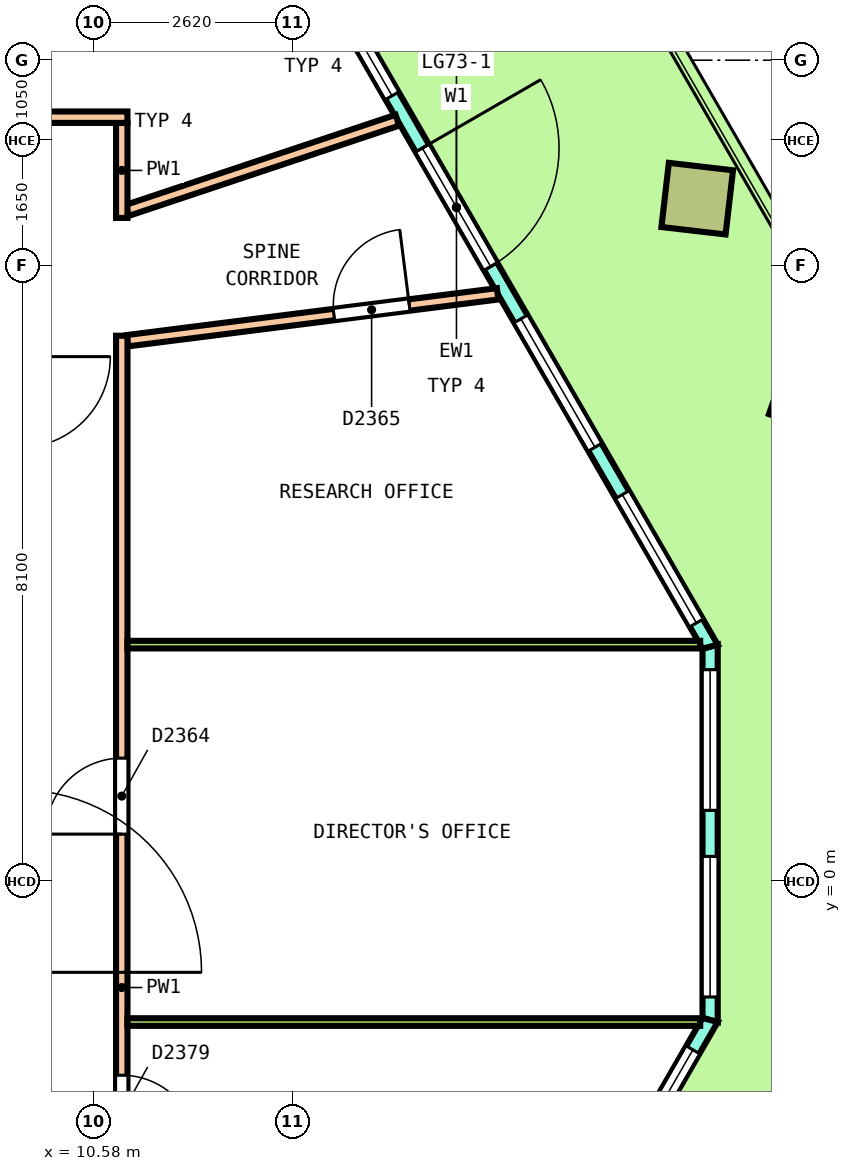
"""IFC4 building model, lengths in metres.
Left out: names, types, materials, properties, quantities, classifications, styles, units other than length and angle.
Written with IfcOpenShell. Run it as: python <this file> out.ifc"""

import sys

from ifc_helpers import new_model, si_unit, direction, frame, frame_2d, origin, origin_2d, place, context, subcontext, project, spatial, polyline, rectangle, outline, extrude, element, fill, save


model = new_model("IFC4")
c1 = context("Model", 3, precision=1e-05, world=origin(), true_north=direction((0.0, 1.0)))
c2 = subcontext(c1, "Body", "Model", "MODEL_VIEW")
j1 = project(units=[si_unit("LENGTHUNIT", "METRE"), si_unit("PLANEANGLEUNIT", "RADIAN")], contexts=[c1])
p1 = place(None, origin())
s1 = spatial("IfcSite", under=j1, at=p1, CompositionType="ELEMENT")
p2 = place(p1, origin())
s2 = spatial("IfcBuilding", under=s1, at=p2, CompositionType="ELEMENT")
p3 = place(p2, frame((0.0, 0.0, 328.6)))
s3 = spatial("IfcBuildingStorey", under=s2, at=p3, CompositionType="ELEMENT", Elevation=328.6)
p4 = place(p3, frame((20.006, 6.406, 0.0), z_axis=(0.021727128018, 0.025136615799, 0.999447888814), x_axis=(-0.501407060892, 0.86514336922, -0.010858636257)))
e1 = element("IfcColumn", 1, at=p4, inside=s3, PredefinedType="COLUMN", context=c2, shape_type="SweptSolid", body=[
    extrude(rectangle(XDim=0.85, YDim=0.85, at=origin_2d()), origin(), (0.0, 0.0, 1.0), 3.652),
])
p5 = place(p3, frame((18.521, 8.978, 0.0), z_axis=(0.025338523594, 0.018853466104, 0.999501128583), x_axis=(-0.500627648171, 0.865655086229, -0.00363724787)))
e2 = element("IfcColumn", 2, at=p5, inside=s3, PredefinedType="COLUMN", context=c2, shape_type="SweptSolid", body=[
    extrude(rectangle(XDim=0.85, YDim=0.85, at=origin_2d()), origin(), (0.0, 0.0, 1.0), 3.652),
])
p6 = place(p3, frame((18.69, -1.827, 0.0), z_axis=(0.0, 0.0, 1.0), x_axis=(0.0, 1.0, 0.0)))
e3 = element("IfcWall", 3, at=p6, inside=s3, PredefinedType="SOLIDWALL", context=c2, shape_type="SweptSolid", body=[
    extrude(outline(polyline([(-0.027, -0.1), (1.214, -0.1), (2.456, -0.1), (3.697, -0.1), (4.938, -0.1), (4.885, 0.1), (3.67, 0.1), (2.456, 0.1), (1.241, 0.1), (0.027, 0.1), (-0.027, -0.1)])), origin(), (0.0, 0.0, 1.0), 3.7),
])
p7 = place(p6, frame((0.303, 0.0, 0.1)))
e4 = element("IfcOpeningElement", 4, at=p7, cuts=e3, PredefinedType="OPENING", context=c2, shape_type="SweptSolid", body=[
    extrude(rectangle(XDim=1.85, YDim=2.9, at=frame_2d((0.925, 1.45))), frame((0.0, 0.11, 0.0), z_axis=(0.0, -1.0, 0.0), x_axis=(1.0, 0.0, 0.0)), (0.0, 0.0, 1.0), 0.22),
])
p8 = place(p6, frame((2.759, 0.0, 0.1)))
e5 = element("IfcOpeningElement", 5, at=p8, cuts=e3, PredefinedType="OPENING", context=c2, shape_type="SweptSolid", body=[
    extrude(rectangle(XDim=1.85, YDim=2.9, at=frame_2d((0.925, 1.45))), frame((0.0, 0.11, 0.0), z_axis=(0.0, -1.0, 0.0), x_axis=(1.0, 0.0, 0.0)), (0.0, 0.0, 1.0), 0.22),
])
p9 = place(p3, frame((18.69, 3.084, 0.0), z_axis=(0.0, 0.0, 1.0), x_axis=(-0.499992657759, 0.866029642788, 0.0)))
e6 = element("IfcWall", 6, at=p9, inside=s3, PredefinedType="SOLIDWALL", context=c2, shape_type="SweptSolid", body=[
    extrude(outline(polyline([(-0.027, -0.1), (1.004, -0.1), (2.035, -0.1), (3.066, -0.1), (4.097, -0.1), (5.128, -0.1), (6.159, -0.1), (7.19, -0.1), (8.221, -0.1), (9.251, -0.1), (10.282, -0.1), (11.313, -0.1), (12.344, -0.1), (13.375, -0.1), (13.322, 0.1), (12.299, 0.1), (11.276, 0.1), (10.253, 0.1), (9.231, 0.1), (8.208, 0.1), (7.186, 0.1), (6.163, 0.1), (5.14, 0.1), (4.117, 0.1), (3.095, 0.1), (2.072, 0.1), (1.05, 0.1), (0.027, 0.1), (-0.027, -0.1)])), origin(), (0.0, 0.0, 1.0), 3.7),
])
p10 = place(p9, frame((0.36, 0.0, 0.1)))
e7 = element("IfcOpeningElement", 7, at=p10, cuts=e6, PredefinedType="OPENING", context=c2, shape_type="SweptSolid", body=[
    extrude(rectangle(XDim=1.95, YDim=2.9, at=frame_2d((0.975, 1.45))), frame((0.0, 0.11, 0.0), z_axis=(0.0, -1.0, 0.0), x_axis=(1.0, 0.0, 0.0)), (0.0, 0.0, 1.0), 0.22),
])
p11 = place(p9, frame((3.03, 0.0, 0.1)))
e8 = element("IfcOpeningElement", 8, at=p11, cuts=e6, PredefinedType="OPENING", context=c2, shape_type="SweptSolid", body=[
    extrude(rectangle(XDim=1.95, YDim=2.9, at=frame_2d((0.975, 1.45))), frame((0.0, 0.11, 0.0), z_axis=(0.0, -1.0, 0.0), x_axis=(1.0, 0.0, 0.0)), (0.0, 0.0, 1.0), 0.22),
])
p12 = place(p9, frame((5.774, 0.0, 0.0)))
e9 = element("IfcOpeningElement", 9, at=p12, cuts=e6, PredefinedType="OPENING", context=c2, shape_type="SweptSolid", body=[
    extrude(rectangle(XDim=1.8, YDim=2.4, at=frame_2d((0.9, 1.2))), frame((0.0, 0.11, 0.0), z_axis=(0.0, -1.0, 0.0), x_axis=(1.0, 0.0, 0.0)), (0.0, 0.0, 1.0), 0.22),
])
p13 = place(p9, frame((5.774, 0.0, 2.55)))
e10 = element("IfcOpeningElement", 10, at=p13, cuts=e6, PredefinedType="OPENING", context=c2, shape_type="SweptSolid", body=[
    extrude(rectangle(XDim=1.8, YDim=0.45, at=frame_2d((0.9, 0.225))), frame((0.0, 0.11, 0.0), z_axis=(0.0, -1.0, 0.0), x_axis=(1.0, 0.0, 0.0)), (0.0, 0.0, 1.0), 0.22),
])
p14 = place(p9, frame((8.369, 0.0, 0.1)))
e11 = element("IfcOpeningElement", 11, at=p14, cuts=e6, PredefinedType="OPENING", context=c2, shape_type="SweptSolid", body=[
    extrude(rectangle(XDim=1.95, YDim=2.9, at=frame_2d((0.975, 1.45))), frame((0.0, 0.11, 0.0), z_axis=(0.0, -1.0, 0.0), x_axis=(1.0, 0.0, 0.0)), (0.0, 0.0, 1.0), 0.22),
])
p15 = place(p9, frame((11.038, 0.0, 0.1)))
e12 = element("IfcOpeningElement", 12, at=p15, cuts=e6, PredefinedType="OPENING", context=c2, shape_type="SweptSolid", body=[
    extrude(rectangle(XDim=1.95, YDim=2.9, at=frame_2d((0.975, 1.45))), frame((0.0, 0.11, 0.0), z_axis=(0.0, -1.0, 0.0), x_axis=(1.0, 0.0, 0.0)), (0.0, 0.0, 1.0), 0.22),
])
p16 = place(p3, frame((10.928, -15.273, 0.0), z_axis=(0.0, 0.0, 1.0), x_axis=(0.500001957507, 0.866024273614, 0.0)))
e13 = element("IfcWall", 13, at=p16, inside=s3, PredefinedType="SOLIDWALL", context=c2, shape_type="SweptSolid", body=[
    extrude(outline(polyline([(-0.027, -0.1), (1.012, -0.1), (2.05, -0.1), (3.089, -0.1), (4.128, -0.1), (5.166, -0.1), (6.205, -0.1), (7.243, -0.1), (8.282, -0.1), (9.321, -0.1), (10.359, -0.1), (11.398, -0.1), (12.437, -0.1), (13.475, -0.1), (14.514, -0.1), (15.552, -0.1), (15.499, 0.1), (14.467, 0.1), (13.436, 0.1), (12.404, 0.1), (11.373, 0.1), (10.341, 0.1), (9.31, 0.1), (8.278, 0.1), (7.247, 0.1), (6.216, 0.1), (5.184, 0.1), (4.153, 0.1), (3.121, 0.1), (2.09, 0.1), (1.058, 0.1), (0.027, 0.1), (-0.027, -0.1)])), origin(), (0.0, 0.0, 1.0), 3.7),
])
p17 = place(p16, frame((0.452, 0.0, 0.1)))
e14 = element("IfcOpeningElement", 14, at=p17, cuts=e13, PredefinedType="OPENING", context=c2, shape_type="SweptSolid", body=[
    extrude(rectangle(XDim=2.2, YDim=2.9, at=frame_2d((1.1, 1.45))), frame((0.0, 0.11, 0.0), z_axis=(0.0, -1.0, 0.0), x_axis=(1.0, 0.0, 0.0)), (0.0, 0.0, 1.0), 0.22),
])
p18 = place(p16, frame((3.558, 0.0, 0.1)))
e15 = element("IfcOpeningElement", 15, at=p18, cuts=e13, PredefinedType="OPENING", context=c2, shape_type="SweptSolid", body=[
    extrude(rectangle(XDim=2.2, YDim=2.9, at=frame_2d((1.1, 1.45))), frame((0.0, 0.11, 0.0), z_axis=(0.0, -1.0, 0.0), x_axis=(1.0, 0.0, 0.0)), (0.0, 0.0, 1.0), 0.22),
])
p19 = place(p16, frame((6.863, 0.0, 0.0)))
e16 = element("IfcOpeningElement", 16, at=p19, cuts=e13, PredefinedType="OPENING", context=c2, shape_type="SweptSolid", body=[
    extrude(rectangle(XDim=1.8, YDim=2.4, at=frame_2d((0.9, 1.2))), frame((0.0, 0.11, 0.0), z_axis=(0.0, -1.0, 0.0), x_axis=(1.0, 0.0, 0.0)), (0.0, 0.0, 1.0), 0.22),
])
p20 = place(p16, frame((6.863, 0.0, 2.55)))
e17 = element("IfcOpeningElement", 17, at=p20, cuts=e13, PredefinedType="OPENING", context=c2, shape_type="SweptSolid", body=[
    extrude(rectangle(XDim=1.8, YDim=0.45, at=frame_2d((0.9, 0.225))), frame((0.0, 0.11, 0.0), z_axis=(0.0, -1.0, 0.0), x_axis=(1.0, 0.0, 0.0)), (0.0, 0.0, 1.0), 0.22),
])
p21 = place(p16, frame((9.768, 0.0, 0.1)))
e18 = element("IfcOpeningElement", 18, at=p21, cuts=e13, PredefinedType="OPENING", context=c2, shape_type="SweptSolid", body=[
    extrude(rectangle(XDim=2.2, YDim=2.9, at=frame_2d((1.1, 1.45))), frame((0.0, 0.11, 0.0), z_axis=(0.0, -1.0, 0.0), x_axis=(1.0, 0.0, 0.0)), (0.0, 0.0, 1.0), 0.22),
])
p22 = place(p16, frame((12.873, 0.0, 0.1)))
e19 = element("IfcOpeningElement", 19, at=p22, cuts=e13, PredefinedType="OPENING", context=c2, shape_type="SweptSolid", body=[
    extrude(rectangle(XDim=2.2, YDim=2.9, at=frame_2d((1.1, 1.45))), frame((0.0, 0.11, 0.0), z_axis=(0.0, -1.0, 0.0), x_axis=(1.0, 0.0, 0.0)), (0.0, 0.0, 1.0), 0.22),
])
p23 = place(p3, frame((11.024, 7.109, 0.0), z_axis=(0.0, 0.0, 1.0), x_axis=(0.992072253701, 0.125668784656, 0.0)))
e20 = element("IfcWall", 20, at=p23, inside=s3, PredefinedType="PARTITIONING", context=c2, shape_type="SweptSolid", body=[
    extrude(rectangle(XDim=4.909, YDim=0.15, at=frame_2d((2.455, 0.0))), origin(), (0.0, 0.0, 1.0), 3.05),
])
p24 = place(p23, frame((2.738, 0.0, 0.0)))
e21 = element("IfcOpeningElement", 21, at=p24, cuts=e20, PredefinedType="OPENING", context=c2, shape_type="SweptSolid", body=[
    extrude(rectangle(XDim=1.0, YDim=2.1, at=frame_2d((0.5, 1.05))), frame((0.0, 0.085, 0.0), z_axis=(0.0, -1.0, 0.0), x_axis=(1.0, 0.0, 0.0)), (0.0, 0.0, 1.0), 0.17),
])
p25 = place(p3, frame((11.021, 8.824, 0.0), z_axis=(0.0, 0.0, 1.0), x_axis=(0.948565981172, 0.316579499279, 0.0)))
e22 = element("IfcWall", 22, at=p25, inside=s3, PredefinedType="PARTITIONING", context=c2, shape_type="SweptSolid", body=[
    extrude(rectangle(XDim=3.748, YDim=0.15, at=frame_2d((1.874, 0.0))), origin(), (0.0, 0.0, 1.0), 3.05),
])
p26 = place(p3, frame((10.95, -9.975, 0.0), z_axis=(0.0, 0.0, 1.0), x_axis=(0.0, 1.0, 0.0)))
e23 = element("IfcWall", 23, at=p26, inside=s3, PredefinedType="PARTITIONING", context=c2, shape_type="SweptSolid", body=[
    extrude(rectangle(XDim=17.15, YDim=0.15, at=frame_2d((8.575, 0.0))), origin(), (0.0, 0.0, 1.0), 3.05),
])
p27 = place(p26, frame((10.593, 0.0, 0.0)))
e24 = element("IfcOpeningElement", 24, at=p27, cuts=e23, PredefinedType="OPENING", context=c2, shape_type="SweptSolid", body=[
    extrude(rectangle(XDim=1.0, YDim=2.1, at=frame_2d((0.5, 1.05))), frame((0.0, 0.085, 0.0), z_axis=(0.0, -1.0, 0.0), x_axis=(1.0, 0.0, 0.0)), (0.0, 0.0, 1.0), 0.17),
])
p28 = place(p26, frame((3.123, 0.0, 0.0)))
e25 = element("IfcOpeningElement", 25, at=p28, cuts=e23, PredefinedType="OPENING", context=c2, shape_type="SweptSolid", body=[
    extrude(rectangle(XDim=1.0, YDim=2.1, at=frame_2d((0.5, 1.05))), frame((0.0, 0.085, 0.0), z_axis=(0.0, -1.0, 0.0), x_axis=(1.0, 0.0, 0.0)), (0.0, 0.0, 1.0), 0.17),
])
p29 = place(p26, frame((6.421, 0.0, 0.0)))
e26 = element("IfcOpeningElement", 26, at=p29, cuts=e23, PredefinedType="OPENING", context=c2, shape_type="SweptSolid", body=[
    extrude(rectangle(XDim=1.0, YDim=2.1, at=frame_2d((0.5, 1.05))), frame((0.0, 0.085, 0.0), z_axis=(0.0, -1.0, 0.0), x_axis=(1.0, 0.0, 0.0)), (0.0, 0.0, 1.0), 0.17),
])
p30 = place(p3, frame((10.95, 8.725, 0.0), z_axis=(0.0, 0.0, 1.0), x_axis=(0.0, 1.0, 0.0)))
e27 = element("IfcWall", 27, at=p30, inside=s3, PredefinedType="PARTITIONING", context=c2, shape_type="SweptSolid", body=[
    extrude(rectangle(XDim=1.25, YDim=0.15, at=frame_2d((0.625, 0.0))), origin(), (0.0, 0.0, 1.0), 3.05),
])
p31 = place(p3, frame((-10.875, 10.05, 0.0), z_axis=(0.0, 0.0, 1.0), x_axis=(1.0, 0.0, 0.0)))
e28 = element("IfcWall", 28, at=p31, inside=s3, PredefinedType="PARTITIONING", context=c2, shape_type="SweptSolid", body=[
    extrude(rectangle(XDim=21.9, YDim=0.15, at=frame_2d((10.95, 0.0))), origin(), (0.0, 0.0, 1.0), 3.05),
])
p32 = place(p31, frame((18.743, 0.0, 0.0)))
e29 = element("IfcOpeningElement", 29, at=p32, cuts=e28, PredefinedType="OPENING", context=c2, shape_type="SweptSolid", body=[
    extrude(rectangle(XDim=1.2, YDim=2.1, at=frame_2d((0.6, 1.05))), frame((0.0, 0.085, 0.0), z_axis=(0.0, -1.0, 0.0), x_axis=(1.0, 0.0, 0.0)), (0.0, 0.0, 1.0), 0.17),
])
p33 = place(p31, frame((13.278, 0.0, 0.0)))
e30 = element("IfcOpeningElement", 30, at=p33, cuts=e28, PredefinedType="OPENING", context=c2, shape_type="SweptSolid", body=[
    extrude(rectangle(XDim=1.0, YDim=2.1, at=frame_2d((0.5, 1.05))), frame((0.0, 0.085, 0.0), z_axis=(0.0, -1.0, 0.0), x_axis=(1.0, 0.0, 0.0)), (0.0, 0.0, 1.0), 0.17),
])
p34 = place(p31, frame((10.021, 0.0, 0.0)))
e31 = element("IfcOpeningElement", 31, at=p34, cuts=e28, PredefinedType="OPENING", context=c2, shape_type="SweptSolid", body=[
    extrude(rectangle(XDim=1.0, YDim=2.1, at=frame_2d((0.5, 1.05))), frame((0.0, 0.085, 0.0), z_axis=(0.0, -1.0, 0.0), x_axis=(1.0, 0.0, 0.0)), (0.0, 0.0, 1.0), 0.17),
])
p35 = place(p31, frame((6.251, 0.0, 0.0)))
e32 = element("IfcOpeningElement", 32, at=p35, cuts=e28, PredefinedType="OPENING", context=c2, shape_type="SweptSolid", body=[
    extrude(rectangle(XDim=1.2, YDim=2.1, at=frame_2d((0.6, 1.05))), frame((0.0, 0.085, 0.0), z_axis=(0.0, -1.0, 0.0), x_axis=(1.0, 0.0, 0.0)), (0.0, 0.0, 1.0), 0.17),
])
p36 = place(p31, frame((1.443, 0.0, 0.0)))
e33 = element("IfcOpeningElement", 33, at=p36, cuts=e28, PredefinedType="OPENING", context=c2, shape_type="SweptSolid", body=[
    extrude(rectangle(XDim=1.0, YDim=2.1, at=frame_2d((0.5, 1.05))), frame((0.0, 0.085, 0.0), z_axis=(0.0, -1.0, 0.0), x_axis=(1.0, 0.0, 0.0)), (0.0, 0.0, 1.0), 0.17),
])
for number, where, z_axis, x_axis in (
    (34, (11.025, 3.111, 0.0), (0.0, 0.0, 1.0), (1.0, 0.0, 0.0)),
    (35, (11.025, -1.854, 0.0), (0.0, 0.0, 1.0), (1.0, 0.0, 0.0)),
):
    element("IfcWall", number, at=place(p3, frame(where, z_axis=z_axis, x_axis=x_axis)), inside=s3, PredefinedType="PARTITIONING", context=c2, shape_type="SweptSolid", body=[
        extrude(rectangle(XDim=7.535, YDim=0.1, at=frame_2d((3.767, 0.0))), origin(), (0.0, 0.0, 1.0), 3.05),
    ])
p37 = place(p7, origin())
e36 = element("IfcWindow", 36, at=p37, inside=s3, PartitioningType="SINGLE_PANEL", PredefinedType="WINDOW", context=c2, shape_type="SweptSolid", body=[
    extrude(rectangle(XDim=1.85, YDim=2.9, at=frame_2d((0.925, 1.45))), frame((0.0, 0.03, 0.0), z_axis=(0.0, -1.0, 0.0), x_axis=(1.0, 0.0, 0.0)), (0.0, 0.0, 1.0), 0.06),
])
fill(e4, e36)
p38 = place(p8, origin())
e37 = element("IfcWindow", 37, at=p38, inside=s3, PartitioningType="SINGLE_PANEL", PredefinedType="WINDOW", context=c2, shape_type="SweptSolid", body=[
    extrude(rectangle(XDim=1.85, YDim=2.9, at=frame_2d((0.925, 1.45))), frame((0.0, 0.03, 0.0), z_axis=(0.0, -1.0, 0.0), x_axis=(1.0, 0.0, 0.0)), (0.0, 0.0, 1.0), 0.06),
])
fill(e5, e37)
p39 = place(p10, origin())
e38 = element("IfcWindow", 38, at=p39, inside=s3, PartitioningType="SINGLE_PANEL", PredefinedType="WINDOW", context=c2, shape_type="SweptSolid", body=[
    extrude(rectangle(XDim=1.95, YDim=2.9, at=frame_2d((0.975, 1.45))), frame((0.0, 0.03, 0.0), z_axis=(0.0, -1.0, 0.0), x_axis=(1.0, 0.0, 0.0)), (0.0, 0.0, 1.0), 0.06),
])
fill(e7, e38)
p40 = place(p11, origin())
e39 = element("IfcWindow", 39, at=p40, inside=s3, PartitioningType="SINGLE_PANEL", PredefinedType="WINDOW", context=c2, shape_type="SweptSolid", body=[
    extrude(rectangle(XDim=1.95, YDim=2.9, at=frame_2d((0.975, 1.45))), frame((0.0, 0.03, 0.0), z_axis=(0.0, -1.0, 0.0), x_axis=(1.0, 0.0, 0.0)), (0.0, 0.0, 1.0), 0.06),
])
fill(e8, e39)
p41 = place(p12, origin())
e40 = element("IfcDoor", 40, at=p41, inside=s3, OperationType="DOUBLE_DOOR_SINGLE_SWING", PredefinedType="DOOR", context=c2, shape_type="SweptSolid", body=[
    extrude(rectangle(XDim=1.8, YDim=2.4, at=frame_2d((0.9, 1.2))), frame((0.0, 0.025, 0.0), z_axis=(0.0, -1.0, 0.0), x_axis=(1.0, 0.0, 0.0)), (0.0, 0.0, 1.0), 0.05),
])
fill(e9, e40)
p42 = place(p13, origin())
e41 = element("IfcWindow", 41, at=p42, inside=s3, PartitioningType="SINGLE_PANEL", PredefinedType="WINDOW", context=c2, shape_type="SweptSolid", body=[
    extrude(rectangle(XDim=1.8, YDim=0.45, at=frame_2d((0.9, 0.225))), frame((0.0, 0.03, 0.0), z_axis=(0.0, -1.0, 0.0), x_axis=(1.0, 0.0, 0.0)), (0.0, 0.0, 1.0), 0.06),
])
fill(e10, e41)
p43 = place(p14, origin())
e42 = element("IfcWindow", 42, at=p43, inside=s3, PartitioningType="SINGLE_PANEL", PredefinedType="WINDOW", context=c2, shape_type="SweptSolid", body=[
    extrude(rectangle(XDim=1.95, YDim=2.9, at=frame_2d((0.975, 1.45))), frame((0.0, 0.03, 0.0), z_axis=(0.0, -1.0, 0.0), x_axis=(1.0, 0.0, 0.0)), (0.0, 0.0, 1.0), 0.06),
])
fill(e11, e42)
p44 = place(p22, origin())
e43 = element("IfcWindow", 43, at=p44, inside=s3, PartitioningType="SINGLE_PANEL", PredefinedType="WINDOW", context=c2, shape_type="SweptSolid", body=[
    extrude(rectangle(XDim=2.2, YDim=2.9, at=frame_2d((1.1, 1.45))), frame((0.0, 0.03, 0.0), z_axis=(0.0, -1.0, 0.0), x_axis=(1.0, 0.0, 0.0)), (0.0, 0.0, 1.0), 0.06),
])
fill(e19, e43)
p45 = place(p27, origin())
e44 = element("IfcDoor", 44, at=p45, inside=s3, OperationType="SINGLE_SWING_RIGHT", PredefinedType="DOOR", context=c2, shape_type="SweptSolid", body=[
    extrude(rectangle(XDim=1.0, YDim=2.1, at=frame_2d((0.5, 1.05))), frame((0.0, 0.025, 0.0), z_axis=(0.0, -1.0, 0.0), x_axis=(1.0, 0.0, 0.0)), (0.0, 0.0, 1.0), 0.05),
])
fill(e24, e44)
p46 = place(p24, origin())
e45 = element("IfcDoor", 45, at=p46, inside=s3, OperationType="SINGLE_SWING_RIGHT", PredefinedType="DOOR", context=c2, shape_type="SweptSolid", body=[
    extrude(rectangle(XDim=1.0, YDim=2.1, at=frame_2d((0.5, 1.05))), frame((0.0, 0.025, 0.0), z_axis=(0.0, -1.0, 0.0), x_axis=(1.0, 0.0, 0.0)), (0.0, 0.0, 1.0), 0.05),
])
fill(e21, e45)
p47 = place(p29, origin())
e46 = element("IfcDoor", 46, at=p47, inside=s3, OperationType="SINGLE_SWING_LEFT", PredefinedType="DOOR", context=c2, shape_type="SweptSolid", body=[
    extrude(rectangle(XDim=1.0, YDim=2.1, at=frame_2d((0.5, 1.05))), frame((0.0, 0.025, 0.0), z_axis=(0.0, -1.0, 0.0), x_axis=(1.0, 0.0, 0.0)), (0.0, 0.0, 1.0), 0.05),
])
fill(e26, e46)
save(model, sys.argv[1])
